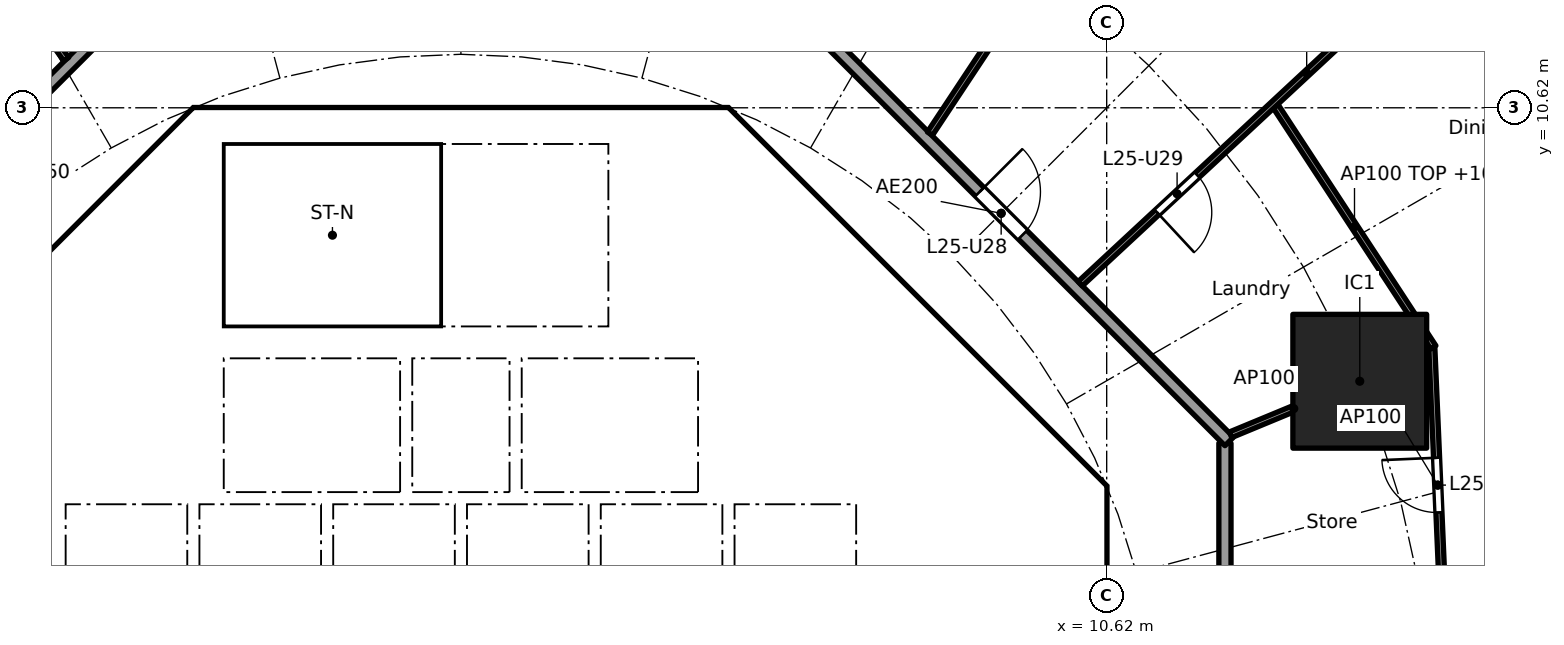
"""IFC4 building model, lengths in metres.
Left out: names, types, materials, properties, quantities, classifications, styles, units other than length and angle.
Written with IfcOpenShell. Run it as: python <this file> out.ifc"""

import sys

from ifc_helpers import new_model, si_unit, direction, frame, frame_2d, origin, origin_2d, place, context, subcontext, project, spatial, polyline, rectangle, outline, extrude, element, fill, save


model = new_model("IFC4")
c1 = context("Model", 3, precision=1e-05, world=origin(), true_north=direction((0.0, 1.0)))
c2 = subcontext(c1, "Body", "Model", "MODEL_VIEW")
j1 = project(units=[si_unit("LENGTHUNIT", "METRE"), si_unit("PLANEANGLEUNIT", "RADIAN")], contexts=[c1])
p1 = place(None, origin())
s1 = spatial("IfcSite", under=j1, at=p1, CompositionType="ELEMENT")
p2 = place(p1, origin())
s2 = spatial("IfcBuilding", under=s1, at=p2, CompositionType="ELEMENT")
p3 = place(p2, frame((0.0, 0.0, 102.9)))
s3 = spatial("IfcBuildingStorey", under=s2, at=p3, CompositionType="ELEMENT", Elevation=102.9)
p4 = place(p3, frame((14.782, 6.123, 0.0), z_axis=(0.0, 0.0, 1.0), x_axis=(1.0, 0.0, 0.0)))
e1 = element("IfcColumn", 1, at=p4, inside=s3, PredefinedType="COLUMN", context=c2, shape_type="SweptSolid", body=[
    extrude(rectangle(XDim=2.2, YDim=2.2, at=origin_2d()), origin(), (0.0, 0.0, 1.0), 3.7),
])
p5 = place(p3, frame((9.988, 4.613, 0.0), z_axis=(0.0, 0.0, 1.0), x_axis=(-0.707106781187, 0.707106781187, 0.0)))
e2 = element("IfcWall", 2, at=p5, inside=s3, PredefinedType="SHEAR", context=c2, shape_type="SweptSolid", body=[
    extrude(rectangle(XDim=7.602, YDim=0.6, at=frame_2d((3.801, 0.0))), origin(), (0.0, 0.0, 1.0), 3.44),
])
p6 = place(p5, frame((3.201, 0.0, 0.0)))
e3 = element("IfcOpeningElement", 3, at=p6, cuts=e2, PredefinedType="OPENING", context=c2, shape_type="SweptSolid", body=[
    extrude(rectangle(XDim=1.2, YDim=2.1, at=frame_2d((0.6, 1.05))), frame((0.0, 0.31, 0.0), z_axis=(0.0, -1.0, 0.0), x_axis=(1.0, 0.0, 0.0)), (0.0, 0.0, 1.0), 0.62),
])
p7 = place(p3, frame((-4.613, 9.988, 0.0), z_axis=(0.0, 0.0, 1.0), x_axis=(-0.707106781187, -0.707106781187, 0.0)))
e4 = element("IfcWall", 4, at=p7, inside=s3, PredefinedType="SHEAR", context=c2, shape_type="SweptSolid", body=[
    extrude(rectangle(XDim=7.602, YDim=0.6, at=frame_2d((3.801, 0.0))), origin(), (0.0, 0.0, 1.0), 3.44),
])
p8 = place(p7, frame((0.351, 0.0, 0.0)))
e5 = element("IfcOpeningElement", 5, at=p8, cuts=e4, PredefinedType="OPENING", context=c2, shape_type="SweptSolid", body=[
    extrude(rectangle(XDim=1.1, YDim=2.1, at=frame_2d((0.55, 1.05))), frame((0.0, 0.31, 0.0), z_axis=(0.0, -1.0, 0.0), x_axis=(1.0, 0.0, 0.0)), (0.0, 0.0, 1.0), 0.62),
])
p9 = place(p3, frame((-5.8, 4.3, 0.0), z_axis=(0.0, 0.0, 1.0), x_axis=(0.0, 1.0, 0.0)))
e6 = element("IfcWall", 6, at=p9, inside=s3, PredefinedType="PARTITIONING", context=c2, shape_type="SweptSolid", body=[
    extrude(rectangle(XDim=3.927, YDim=0.15, at=frame_2d((1.963, 0.0))), origin(), (0.0, 0.0, 1.0), 3.44),
])
p10 = place(p9, frame((0.413, 0.0, 0.0)))
e7 = element("IfcOpeningElement", 7, at=p10, cuts=e6, PredefinedType="OPENING", context=c2, shape_type="SweptSolid", body=[
    extrude(rectangle(XDim=0.9, YDim=2.1, at=frame_2d((0.45, 1.05))), frame((0.0, 0.085, 0.0), z_axis=(0.0, -1.0, 0.0), x_axis=(1.0, 0.0, 0.0)), (0.0, 0.0, 1.0), 0.17),
])
p11 = place(p9, frame((2.489, 0.0, 0.0)))
e8 = element("IfcOpeningElement", 8, at=p11, cuts=e6, PredefinedType="OPENING", context=c2, shape_type="SweptSolid", body=[
    extrude(rectangle(XDim=0.9, YDim=2.1, at=frame_2d((0.45, 1.05))), frame((0.0, 0.085, 0.0), z_axis=(0.0, -1.0, 0.0), x_axis=(1.0, 0.0, 0.0)), (0.0, 0.0, 1.0), 0.17),
])
p12 = place(p3, frame((4.0, 4.3, 0.0), z_axis=(0.0, 0.0, 1.0), x_axis=(0.0, 1.0, 0.0)))
e9 = element("IfcWall", 9, at=p12, inside=s3, PredefinedType="SOLIDWALL", context=c2, shape_type="SweptSolid", body=[
    extrude(rectangle(XDim=2.2, YDim=0.2, at=frame_2d((1.1, 0.0))), origin(), (0.0, 0.0, 1.0), 3.44),
])
p13 = place(p12, frame((0.55, 0.0, 0.0)))
e10 = element("IfcOpeningElement", 10, at=p13, cuts=e9, PredefinedType="OPENING", context=c2, shape_type="SweptSolid", body=[
    extrude(rectangle(XDim=1.1, YDim=2.1, at=frame_2d((0.55, 1.05))), frame((0.0, 0.11, 0.0), z_axis=(0.0, -1.0, 0.0), x_axis=(1.0, 0.0, 0.0)), (0.0, 0.0, 1.0), 0.22),
])
p14 = place(p3, frame((-4.0, 4.3, 0.0), z_axis=(0.0, 0.0, 1.0), x_axis=(0.0, 1.0, 0.0)))
e11 = element("IfcWall", 11, at=p14, inside=s3, PredefinedType="SOLIDWALL", context=c2, shape_type="SweptSolid", body=[
    extrude(rectangle(XDim=2.2, YDim=0.2, at=frame_2d((1.1, 0.0))), origin(), (0.0, 0.0, 1.0), 3.44),
])
p15 = place(p14, frame((0.55, 0.0, 0.0)))
e12 = element("IfcOpeningElement", 12, at=p15, cuts=e11, PredefinedType="OPENING", context=c2, shape_type="SweptSolid", body=[
    extrude(rectangle(XDim=1.1, YDim=2.1, at=frame_2d((0.55, 1.05))), frame((0.0, 0.11, 0.0), z_axis=(0.0, -1.0, 0.0), x_axis=(1.0, 0.0, 0.0)), (0.0, 0.0, 1.0), 0.22),
])
p16 = place(p3, frame((6.7, 4.0, 0.0), z_axis=(0.0, 0.0, 1.0), x_axis=(1.0, 0.0, 0.0)))
e13 = element("IfcWall", 13, at=p16, inside=s3, PredefinedType="SOLIDWALL", context=c2, shape_type="SweptSolid", body=[
    extrude(rectangle(XDim=3.325, YDim=0.2, at=frame_2d((1.662, 0.0))), origin(), (0.0, 0.0, 1.0), 3.44),
])
p17 = place(p16, frame((1.25, 0.0, 0.0)))
e14 = element("IfcOpeningElement", 14, at=p17, cuts=e13, PredefinedType="OPENING", context=c2, shape_type="SweptSolid", body=[
    extrude(rectangle(XDim=1.1, YDim=2.1, at=frame_2d((0.55, 1.05))), frame((0.0, 0.11, 0.0), z_axis=(0.0, -1.0, 0.0), x_axis=(1.0, 0.0, 0.0)), (0.0, 0.0, 1.0), 0.22),
])
p18 = place(p3, frame((4.0, 7.025, 0.0), z_axis=(0.0, 0.0, 1.0), x_axis=(0.0, 1.0, 0.0)))
e15 = element("IfcWall", 15, at=p18, inside=s3, PredefinedType="SOLIDWALL", context=c2, shape_type="SweptSolid", body=[
    extrude(rectangle(XDim=3.0, YDim=0.2, at=frame_2d((1.5, 0.0))), origin(), (0.0, 0.0, 1.0), 3.44),
])
p19 = place(p18, frame((0.925, 0.0, 0.0)))
e16 = element("IfcOpeningElement", 16, at=p19, cuts=e15, PredefinedType="OPENING", context=c2, shape_type="SweptSolid", body=[
    extrude(rectangle(XDim=1.1, YDim=2.1, at=frame_2d((0.55, 1.05))), frame((0.0, 0.11, 0.0), z_axis=(0.0, -1.0, 0.0), x_axis=(1.0, 0.0, 0.0)), (0.0, 0.0, 1.0), 0.22),
])
p20 = place(p3, origin())
e17 = element("IfcWall", 17, at=p20, inside=s3, PredefinedType="SHEAR", context=c2, shape_type="SweptSolid", body=[
    extrude(outline(polyline([(-4.152, 10.025), (-4.401, 9.776), (-4.825, 10.2), (-4.401, 10.625), (4.401, 10.625), (4.825, 10.2), (4.401, 9.776), (4.152, 10.025), (-4.152, 10.025)])), origin(), (0.0, 0.0, 1.0), 3.44),
])
p21 = place(p3, origin())
e18 = element("IfcWall", 18, at=p21, inside=s3, PredefinedType="SHEAR", context=c2, shape_type="SweptSolid", body=[
    extrude(outline(polyline([(9.776, -4.401), (10.025, -4.152), (10.025, -3.801), (10.025, 4.152), (9.776, 4.401), (10.2, 4.825), (10.625, 4.401), (10.625, -4.401), (10.2, -4.825), (9.776, -4.401)])), origin(), (0.0, 0.0, 1.0), 3.44),
])
p22 = place(p3, frame((-10.025, 4.0, 0.0), z_axis=(0.0, 0.0, 1.0), x_axis=(1.0, 0.0, 0.0)))
e19 = element("IfcWall", 19, at=p22, inside=s3, PredefinedType="PARTITIONING", context=c2, shape_type="SweptSolid", body=[
    extrude(rectangle(XDim=3.325, YDim=0.2, at=frame_2d((1.662, 0.0))), origin(), (0.0, 0.0, 1.0), 3.44),
])
p23 = place(p3, frame((-8.001, 6.1, 0.0), z_axis=(0.0, 0.0, 1.0), x_axis=(1.0, 0.0, 0.0)))
e20 = element("IfcWall", 20, at=p23, inside=s3, PredefinedType="PARTITIONING", context=c2, shape_type="SweptSolid", body=[
    extrude(rectangle(XDim=2.126, YDim=0.15, at=frame_2d((1.063, 0.0))), origin(), (0.0, 0.0, 1.0), 3.44),
])
for number, where, z_axis, x_axis in (
    (21, (-0.9, 4.3, 0.0), (0.0, 0.0, 1.0), (0.0, 1.0, 0.0)),
    (22, (0.9, 4.3, 0.0), (0.0, 0.0, 1.0), (0.0, 1.0, 0.0)),
):
    element("IfcWall", number, at=place(p3, frame(where, z_axis=z_axis, x_axis=x_axis)), inside=s3, PredefinedType="SOLIDWALL", context=c2, shape_type="SweptSolid", body=[
        extrude(rectangle(XDim=2.2, YDim=0.2, at=frame_2d((1.1, 0.0))), origin(), (0.0, 0.0, 1.0), 3.44),
    ])
p24 = place(p3, origin())
e23 = element("IfcWall", 23, at=p24, inside=s3, PredefinedType="SOLIDWALL", context=c2, shape_type="SweptSolid", body=[
    extrude(outline(polyline([(-6.5, 2.1), (-6.7, 2.1), (-6.7, 4.3), (6.7, 4.3), (6.7, 2.1), (6.5, 2.1), (6.5, 4.1), (4.5, 4.1), (4.5, 2.1), (4.3, 2.1), (4.3, 4.1), (2.3, 4.1), (2.3, 2.1), (2.1, 2.1), (2.1, 4.1), (0.1, 4.1), (0.1, 2.1), (-0.1, 2.1), (-0.1, 4.1), (-2.1, 4.1), (-2.1, 2.1), (-2.3, 2.1), (-2.3, 4.1), (-4.3, 4.1), (-4.3, 2.1), (-4.5, 2.1), (-4.5, 4.1), (-6.5, 4.1), (-6.5, 2.1)])), origin(), (0.0, 0.0, 1.0), 3.44),
])
p25 = place(p3, origin())
e24 = element("IfcWall", 24, at=p25, inside=s3, PredefinedType="SOLIDWALL", context=c2, shape_type="SweptSolid", body=[
    extrude(outline(polyline([(-3.9, 7.025), (-4.1, 7.025), (-4.1, 10.025), (-3.9, 10.025), (-3.9, 7.025)])), origin(), (0.0, 0.0, 1.0), 3.44),
])
p26 = place(p3, origin())
e25 = element("IfcWall", 25, at=p26, inside=s3, PredefinedType="SOLIDWALL", context=c2, shape_type="SweptSolid", body=[
    extrude(outline(polyline([(4.1, 6.5), (-4.1, 6.5), (-4.1, 7.025), (4.1, 7.025), (4.1, 6.5)])), origin(), (0.0, 0.0, 1.0), 3.44),
])
p27 = place(p3, origin())
e26 = element("IfcWall", 26, at=p27, inside=s3, PredefinedType="SOLIDWALL", context=c2, shape_type="SweptSolid", body=[
    extrude(outline(polyline([(7.025, -3.9), (6.7, -3.9), (6.7, 3.9), (7.025, 3.9), (7.025, -3.9)])), origin(), (0.0, 0.0, 1.0), 3.44),
])
p28 = place(p3, frame((12.565, -5.104, 0.0), z_axis=(0.0, 0.0, 1.0), x_axis=(0.0, 1.0, 0.0)))
e27 = element("IfcWall", 27, at=p28, inside=s3, PredefinedType="PARTITIONING", context=c2, shape_type="SweptSolid", body=[
    extrude(rectangle(XDim=10.209, YDim=0.2, at=frame_2d((5.104, 0.0))), origin(), (0.0, 0.0, 1.0), 3.44),
])
p29 = place(p3, frame((12.635, 5.134, 0.0), z_axis=(0.0, 0.0, 1.0), x_axis=(-0.707106781187, 0.707106781187, 0.0)))
e28 = element("IfcWall", 28, at=p29, inside=s3, PredefinedType="PARTITIONING", context=c2, shape_type="SweptSolid", body=[
    extrude(rectangle(XDim=10.609, YDim=0.2, at=frame_2d((5.305, 0.0))), origin(), (0.0, 0.0, 1.0), 3.44),
])
p30 = place(p29, frame((4.804, 0.0, 0.0)))
e29 = element("IfcOpeningElement", 29, at=p30, cuts=e28, PredefinedType="OPENING", context=c2, shape_type="SweptSolid", body=[
    extrude(rectangle(XDim=1.0, YDim=2.1, at=frame_2d((0.5, 1.05))), frame((0.0, 0.11, 0.0), z_axis=(0.0, -1.0, 0.0), x_axis=(1.0, 0.0, 0.0)), (0.0, 0.0, 1.0), 0.22),
])
p31 = place(p3, frame((-5.275, 12.494, 0.0), z_axis=(0.0, 0.0, 1.0), x_axis=(-0.707106781187, -0.707106781187, 0.0)))
e30 = element("IfcWall", 30, at=p31, inside=s3, PredefinedType="PARTITIONING", context=c2, shape_type="SweptSolid", body=[
    extrude(rectangle(XDim=10.209, YDim=0.2, at=frame_2d((5.104, 0.0))), origin(), (0.0, 0.0, 1.0), 3.44),
])
p32 = place(p31, frame((2.87, 0.0, 0.0)))
e31 = element("IfcOpeningElement", 31, at=p32, cuts=e30, PredefinedType="OPENING", context=c2, shape_type="SweptSolid", body=[
    extrude(rectangle(XDim=1.0, YDim=2.1, at=frame_2d((0.5, 1.05))), frame((0.0, 0.11, 0.0), z_axis=(0.0, -1.0, 0.0), x_axis=(1.0, 0.0, 0.0)), (0.0, 0.0, 1.0), 0.22),
])
p33 = place(p3, frame((16.162, 2.158, 0.0), z_axis=(0.0, 0.0, 1.0), x_axis=(-0.043120653248, 0.999069872063, 0.0)))
e32 = element("IfcWall", 32, at=p33, inside=s3, PredefinedType="PARTITIONING", context=c2, shape_type="SweptSolid", body=[
    extrude(rectangle(XDim=4.518, YDim=0.1, at=frame_2d((2.259, 0.0))), origin(), (0.0, 0.0, 1.0), 3.44),
])
p34 = place(p33, frame((1.809, 0.0, 0.0)))
e33 = element("IfcOpeningElement", 33, at=p34, cuts=e32, PredefinedType="OPENING", context=c2, shape_type="SweptSolid", body=[
    extrude(rectangle(XDim=0.9, YDim=2.1, at=frame_2d((0.45, 1.05))), frame((0.0, 0.06, 0.0), z_axis=(0.0, -1.0, 0.0), x_axis=(1.0, 0.0, 0.0)), (0.0, 0.0, 1.0), 0.12),
])
p35 = place(p3, frame((12.657, 5.243, 0.0), z_axis=(0.0, 0.0, 1.0), x_axis=(0.923864733477, 0.382719158442, 0.0)))
e34 = element("IfcWall", 34, at=p35, inside=s3, PredefinedType="PARTITIONING", context=c2, shape_type="SweptSolid", body=[
    extrude(rectangle(XDim=2.25, YDim=0.1, at=frame_2d((1.125, 0.0))), origin(), (0.0, 0.0, 1.0), 3.44),
])
p36 = place(p3, frame((15.992, 6.68, 0.0), z_axis=(0.0, 0.0, 1.0), x_axis=(-0.547472878942, 0.836823426311, 0.0)))
e35 = element("IfcWall", 35, at=p36, inside=s3, PredefinedType="PARTITIONING", context=c2, shape_type="SweptSolid", body=[
    extrude(rectangle(XDim=4.738, YDim=0.1, at=frame_2d((2.369, 0.0))), origin(), (0.0, 0.0, 1.0), 2.762),
])
p37 = place(p3, frame((10.185, 7.726, 0.0), z_axis=(0.0, 0.0, 1.0), x_axis=(0.732598472978, 0.680661059112, 0.0)))
e36 = element("IfcWall", 36, at=p37, inside=s3, PredefinedType="PARTITIONING", context=c2, shape_type="SweptSolid", body=[
    extrude(rectangle(XDim=10.167, YDim=0.1, at=frame_2d((5.084, 0.0))), origin(), (0.0, 0.0, 1.0), 2.687),
])
p38 = place(p37, frame((1.725, 0.0, 0.0)))
e37 = element("IfcOpeningElement", 37, at=p38, cuts=e36, PredefinedType="OPENING", context=c2, shape_type="SweptSolid", body=[
    extrude(rectangle(XDim=0.9, YDim=2.1, at=frame_2d((0.45, 1.05))), frame((0.0, 0.06, 0.0), z_axis=(0.0, -1.0, 0.0), x_axis=(1.0, 0.0, 0.0)), (0.0, 0.0, 1.0), 0.12),
])
p39 = place(p37, frame((6.784, 0.0, 0.0)))
e38 = element("IfcOpeningElement", 38, at=p39, cuts=e36, PredefinedType="OPENING", context=c2, shape_type="SweptSolid", body=[
    extrude(rectangle(XDim=0.9, YDim=2.1, at=frame_2d((0.45, 1.05))), frame((0.0, 0.06, 0.0), z_axis=(0.0, -1.0, 0.0), x_axis=(1.0, 0.0, 0.0)), (0.0, 0.0, 1.0), 0.12),
])
p40 = place(p3, frame((7.713, 10.195, 0.0), z_axis=(0.0, 0.0, 1.0), x_axis=(0.552111071171, 0.833770571015, 0.0)))
e39 = element("IfcWall", 39, at=p40, inside=s3, PredefinedType="PARTITIONING", context=c2, shape_type="SweptSolid", body=[
    extrude(rectangle(XDim=17.208, YDim=0.1, at=frame_2d((8.604, 0.0))), origin(), (0.0, 0.0, 1.0), 2.687),
])
p41 = place(p40, frame((1.976, 0.0, 0.0)))
e40 = element("IfcOpeningElement", 40, at=p41, cuts=e39, PredefinedType="OPENING", context=c2, shape_type="SweptSolid", body=[
    extrude(rectangle(XDim=0.9, YDim=2.1, at=frame_2d((0.45, 1.05))), frame((0.0, 0.06, 0.0), z_axis=(0.0, -1.0, 0.0), x_axis=(1.0, 0.0, 0.0)), (0.0, 0.0, 1.0), 0.12),
])
p42 = place(p40, frame((7.611, 0.0, 0.0)))
e41 = element("IfcOpeningElement", 41, at=p42, cuts=e39, PredefinedType="OPENING", context=c2, shape_type="SweptSolid", body=[
    extrude(rectangle(XDim=0.9, YDim=2.1, at=frame_2d((0.45, 1.05))), frame((0.0, 0.06, 0.0), z_axis=(0.0, -1.0, 0.0), x_axis=(1.0, 0.0, 0.0)), (0.0, 0.0, 1.0), 0.12),
])
p43 = place(p40, frame((13.79, 0.0, 0.0)))
e42 = element("IfcOpeningElement", 42, at=p43, cuts=e39, PredefinedType="OPENING", context=c2, shape_type="SweptSolid", body=[
    extrude(rectangle(XDim=0.9, YDim=2.1, at=frame_2d((0.45, 1.05))), frame((0.0, 0.06, 0.0), z_axis=(0.0, -1.0, 0.0), x_axis=(1.0, 0.0, 0.0)), (0.0, 0.0, 1.0), 0.12),
])
p44 = place(p3, frame((-6.49, 11.419, 0.0), z_axis=(0.0, 0.0, 1.0), x_axis=(-0.584832823883, 0.811153849839, 0.0)))
e43 = element("IfcWall", 43, at=p44, inside=s3, PredefinedType="PARTITIONING", context=c2, shape_type="SweptSolid", body=[
    extrude(rectangle(XDim=12.553, YDim=0.1, at=frame_2d((6.277, 0.0))), origin(), (0.0, 0.0, 1.0), 2.687),
])
p45 = place(p44, frame((4.166, 0.0, 0.0)))
e44 = element("IfcOpeningElement", 44, at=p45, cuts=e43, PredefinedType="OPENING", context=c2, shape_type="SweptSolid", body=[
    extrude(rectangle(XDim=0.9, YDim=2.1, at=frame_2d((0.45, 1.05))), frame((0.0, 0.06, 0.0), z_axis=(0.0, -1.0, 0.0), x_axis=(1.0, 0.0, 0.0)), (0.0, 0.0, 1.0), 0.12),
])
p46 = place(p13, origin())
e45 = element("IfcDoor", 45, at=p46, inside=s3, OperationType="DOUBLE_DOOR_SLIDING", PredefinedType="DOOR", context=c2, shape_type="SweptSolid", body=[
    extrude(rectangle(XDim=1.1, YDim=2.1, at=frame_2d((0.55, 1.05))), frame((0.0, 0.025, 0.0), z_axis=(0.0, -1.0, 0.0), x_axis=(1.0, 0.0, 0.0)), (0.0, 0.0, 1.0), 0.05),
])
fill(e10, e45)
p47 = place(p15, origin())
e46 = element("IfcDoor", 46, at=p47, inside=s3, OperationType="DOUBLE_DOOR_SLIDING", PredefinedType="DOOR", context=c2, shape_type="SweptSolid", body=[
    extrude(rectangle(XDim=1.1, YDim=2.1, at=frame_2d((0.55, 1.05))), frame((0.0, 0.025, 0.0), z_axis=(0.0, -1.0, 0.0), x_axis=(1.0, 0.0, 0.0)), (0.0, 0.0, 1.0), 0.05),
])
fill(e12, e46)
p48 = place(p17, frame((1.1, 0.0, 0.0), x_axis=(-1.0, 0.0, 0.0)))
e47 = element("IfcDoor", 47, at=p48, inside=s3, OperationType="SINGLE_SWING_RIGHT", PredefinedType="DOOR", context=c2, shape_type="SweptSolid", body=[
    extrude(rectangle(XDim=1.1, YDim=2.1, at=frame_2d((0.55, 1.05))), frame((0.0, 0.025, 0.0), z_axis=(0.0, -1.0, 0.0), x_axis=(1.0, 0.0, 0.0)), (0.0, 0.0, 1.0), 0.05),
])
fill(e14, e47)
p49 = place(p19, origin())
e48 = element("IfcDoor", 48, at=p49, inside=s3, OperationType="SINGLE_SWING_LEFT", PredefinedType="DOOR", context=c2, shape_type="SweptSolid", body=[
    extrude(rectangle(XDim=1.1, YDim=2.1, at=frame_2d((0.55, 1.05))), frame((0.0, 0.025, 0.0), z_axis=(0.0, -1.0, 0.0), x_axis=(1.0, 0.0, 0.0)), (0.0, 0.0, 1.0), 0.05),
])
fill(e16, e48)
p50 = place(p10, origin())
e49 = element("IfcDoor", 49, at=p50, inside=s3, OperationType="SINGLE_SWING_RIGHT", PredefinedType="DOOR", context=c2, shape_type="SweptSolid", body=[
    extrude(rectangle(XDim=0.9, YDim=2.1, at=frame_2d((0.45, 1.05))), frame((0.0, 0.025, 0.0), z_axis=(0.0, -1.0, 0.0), x_axis=(1.0, 0.0, 0.0)), (0.0, 0.0, 1.0), 0.05),
])
fill(e7, e49)
p51 = place(p11, origin())
e50 = element("IfcDoor", 50, at=p51, inside=s3, OperationType="SINGLE_SWING_RIGHT", PredefinedType="DOOR", context=c2, shape_type="SweptSolid", body=[
    extrude(rectangle(XDim=0.9, YDim=2.1, at=frame_2d((0.45, 1.05))), frame((0.0, 0.025, 0.0), z_axis=(0.0, -1.0, 0.0), x_axis=(1.0, 0.0, 0.0)), (0.0, 0.0, 1.0), 0.05),
])
fill(e8, e50)
p52 = place(p6, origin())
e51 = element("IfcDoor", 51, at=p52, inside=s3, OperationType="SINGLE_SWING_LEFT", PredefinedType="DOOR", context=c2, shape_type="SweptSolid", body=[
    extrude(rectangle(XDim=1.2, YDim=2.1, at=frame_2d((0.6, 1.05))), frame((0.0, 0.025, 0.0), z_axis=(0.0, -1.0, 0.0), x_axis=(1.0, 0.0, 0.0)), (0.0, 0.0, 1.0), 0.05),
])
fill(e3, e51)
p53 = place(p8, origin())
e52 = element("IfcDoor", 52, at=p53, inside=s3, OperationType="SINGLE_SWING_LEFT", PredefinedType="DOOR", context=c2, shape_type="SweptSolid", body=[
    extrude(rectangle(XDim=1.1, YDim=2.1, at=frame_2d((0.55, 1.05))), frame((0.0, 0.025, 0.0), z_axis=(0.0, -1.0, 0.0), x_axis=(1.0, 0.0, 0.0)), (0.0, 0.0, 1.0), 0.05),
])
fill(e5, e52)
p54 = place(p30, frame((1.0, 0.0, 0.0), x_axis=(-1.0, 0.0, 0.0)))
e53 = element("IfcDoor", 53, at=p54, inside=s3, OperationType="SINGLE_SWING_LEFT", PredefinedType="DOOR", context=c2, shape_type="SweptSolid", body=[
    extrude(rectangle(XDim=1.0, YDim=2.1, at=frame_2d((0.5, 1.05))), frame((0.0, 0.025, 0.0), z_axis=(0.0, -1.0, 0.0), x_axis=(1.0, 0.0, 0.0)), (0.0, 0.0, 1.0), 0.05),
])
fill(e29, e53)
p55 = place(p38, frame((0.9, 0.0, 0.0), x_axis=(-1.0, 0.0, 0.0)))
e54 = element("IfcDoor", 54, at=p55, inside=s3, OperationType="SINGLE_SWING_RIGHT", PredefinedType="DOOR", context=c2, shape_type="SweptSolid", body=[
    extrude(rectangle(XDim=0.9, YDim=2.1, at=frame_2d((0.45, 1.05))), frame((0.0, 0.025, 0.0), z_axis=(0.0, -1.0, 0.0), x_axis=(1.0, 0.0, 0.0)), (0.0, 0.0, 1.0), 0.05),
])
fill(e37, e54)
p56 = place(p34, origin())
e55 = element("IfcDoor", 55, at=p56, inside=s3, OperationType="SINGLE_SWING_RIGHT", PredefinedType="DOOR", context=c2, shape_type="SweptSolid", body=[
    extrude(rectangle(XDim=0.9, YDim=2.1, at=frame_2d((0.45, 1.05))), frame((0.0, 0.025, 0.0), z_axis=(0.0, -1.0, 0.0), x_axis=(1.0, 0.0, 0.0)), (0.0, 0.0, 1.0), 0.05),
])
fill(e33, e55)
save(model, sys.argv[1])
